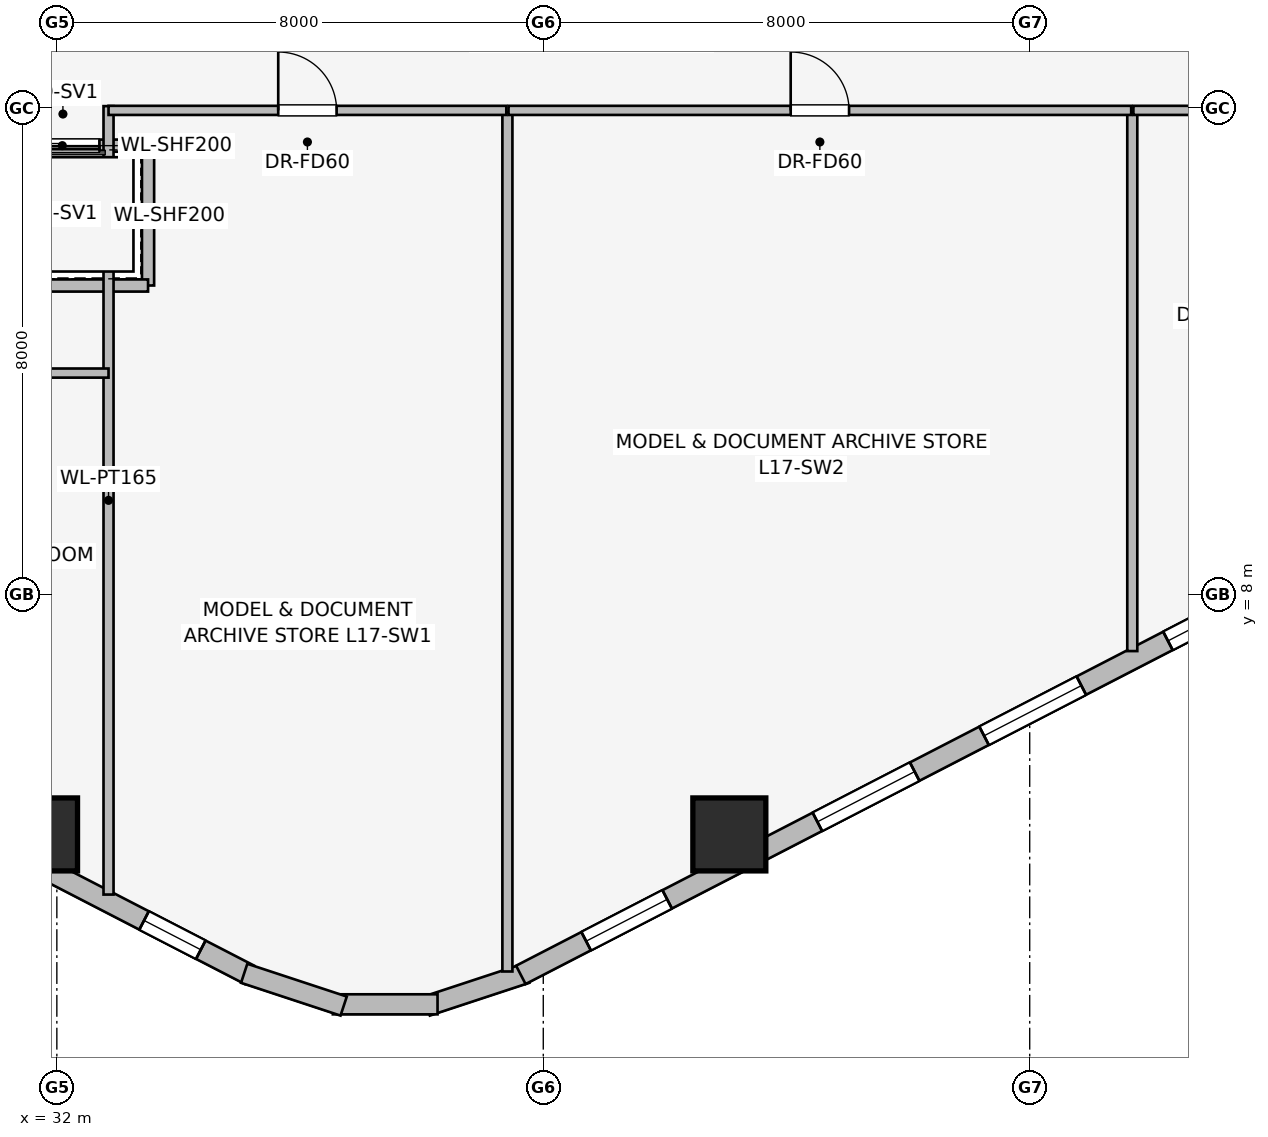
"""IFC4 building model, lengths in metres.
Left out: names, types, materials, properties, quantities, classifications, styles, units other than length and angle.
Written with IfcOpenShell. Run it as: python <this file> out.ifc"""

import sys

from ifc_helpers import new_model, si_unit, direction, frame, frame_2d, origin, origin_2d, place, context, subcontext, project, spatial, rectangle, extrude, element, fill, save


model = new_model("IFC4")
c1 = context("Model", 3, precision=1e-05, world=origin(), true_north=direction((0.0, 1.0)))
c2 = subcontext(c1, "Body", "Model", "MODEL_VIEW")
j1 = project(units=[si_unit("LENGTHUNIT", "METRE"), si_unit("PLANEANGLEUNIT", "RADIAN")], contexts=[c1])
p1 = place(None, origin())
s1 = spatial("IfcSite", under=j1, at=p1, CompositionType="ELEMENT")
p2 = place(p1, origin())
s2 = spatial("IfcBuilding", under=s1, at=p2, CompositionType="ELEMENT")
p3 = place(p2, frame((0.0, 0.0, 67.15)))
s3 = spatial("IfcBuildingStorey", under=s2, at=p3, CompositionType="ELEMENT", Elevation=67.15)
for number, where, z_axis, x_axis in (
    (1, (31.74, 4.053, 0.0), (0.0, 0.0, 1.0), (1.0, 0.0, 0.0)),
    (2, (43.06, 4.053, 0.0), (0.0, 0.0, 1.0), (1.0, 0.0, 0.0)),
):
    element("IfcColumn", number, at=place(p3, frame(where, z_axis=z_axis, x_axis=x_axis)), inside=s3, PredefinedType="COLUMN", context=c2, shape_type="SweptSolid", body=[
        extrude(rectangle(XDim=1.2, YDim=1.2, at=origin_2d()), origin(), (0.0, 0.0, 1.0), 3.65),
    ])
p4 = place(p3, frame((35.169, 1.743, 0.0), z_axis=(0.0, 0.0, 1.0), x_axis=(-0.888634413993, 0.458616264721, 0.0)))
e3 = element("IfcWall", 3, at=p4, inside=s3, PredefinedType="STANDARD", context=c2, shape_type="SweptSolid", body=[
    extrude(rectangle(XDim=20.531, YDim=0.34, at=frame_2d((10.266, 0.0))), origin(), (0.0, 0.0, 1.0), 2.684),
])
p5 = place(p4, frame((0.902, 0.0, 0.75)))
e4 = element("IfcOpeningElement", 4, at=p5, cuts=e3, PredefinedType="OPENING", context=c2, shape_type="SweptSolid", body=[
    extrude(rectangle(XDim=1.05, YDim=1.4, at=frame_2d((0.525, 0.7))), frame((0.0, 0.18, 0.0), z_axis=(0.0, -1.0, 0.0), x_axis=(1.0, 0.0, 0.0)), (0.0, 0.0, 1.0), 0.36),
])
p6 = place(p4, frame((5.903, 0.0, 0.75)))
e5 = element("IfcOpeningElement", 5, at=p6, cuts=e3, PredefinedType="OPENING", context=c2, shape_type="SweptSolid", body=[
    extrude(rectangle(XDim=1.5, YDim=1.5, at=frame_2d((0.75, 0.75))), frame((0.0, 0.18, 0.0), z_axis=(0.0, -1.0, 0.0), x_axis=(1.0, 0.0, 0.0)), (0.0, 0.0, 1.0), 0.36),
])
p7 = place(p4, frame((9.516, 0.0, 0.75)))
e6 = element("IfcOpeningElement", 6, at=p7, cuts=e3, PredefinedType="OPENING", context=c2, shape_type="SweptSolid", body=[
    extrude(rectangle(XDim=1.5, YDim=1.5, at=frame_2d((0.75, 0.75))), frame((0.0, 0.18, 0.0), z_axis=(0.0, -1.0, 0.0), x_axis=(1.0, 0.0, 0.0)), (0.0, 0.0, 1.0), 0.36),
])
p8 = place(p4, frame((13.129, 0.0, 0.75)))
e7 = element("IfcOpeningElement", 7, at=p8, cuts=e3, PredefinedType="OPENING", context=c2, shape_type="SweptSolid", body=[
    extrude(rectangle(XDim=1.5, YDim=1.5, at=frame_2d((0.75, 0.75))), frame((0.0, 0.18, 0.0), z_axis=(0.0, -1.0, 0.0), x_axis=(1.0, 0.0, 0.0)), (0.0, 0.0, 1.0), 0.36),
])
p9 = place(p4, frame((17.673, 0.0, 0.75)))
e8 = element("IfcOpeningElement", 8, at=p9, cuts=e3, PredefinedType="OPENING", context=c2, shape_type="SweptSolid", body=[
    extrude(rectangle(XDim=1.8, YDim=1.5, at=frame_2d((0.9, 0.75))), frame((0.0, 0.18, 0.0), z_axis=(0.0, -1.0, 0.0), x_axis=(1.0, 0.0, 0.0)), (0.0, 0.0, 1.0), 0.36),
])
p10 = place(p3, frame((39.719, 1.769, 0.0), z_axis=(0.0, 0.0, 1.0), x_axis=(-0.94976901097, -0.312951794691, 0.0)))
e9 = element("IfcWall", 9, at=p10, inside=s3, PredefinedType="STANDARD", context=c2, shape_type="SweptSolid", body=[
    extrude(rectangle(XDim=1.722, YDim=0.33, at=frame_2d((0.861, 0.0))), origin(), (0.0, 0.0, 1.0), 3.39),
])
p11 = place(p3, frame((38.261, 1.259, 0.0), z_axis=(0.0, 0.0, 1.0), x_axis=(-1.0, 0.0, 0.0)))
e10 = element("IfcWall", 10, at=p11, inside=s3, PredefinedType="STANDARD", context=c2, shape_type="SweptSolid", body=[
    extrude(rectangle(XDim=1.722, YDim=0.33, at=frame_2d((0.861, 0.0))), origin(), (0.0, 0.0, 1.0), 3.39),
])
p12 = place(p3, frame((36.717, 1.23, 0.0), z_axis=(0.0, 0.0, 1.0), x_axis=(-0.94976901097, 0.312951794691, 0.0)))
e11 = element("IfcWall", 11, at=p12, inside=s3, PredefinedType="STANDARD", context=c2, shape_type="SweptSolid", body=[
    extrude(rectangle(XDim=1.722, YDim=0.33, at=frame_2d((0.861, 0.0))), origin(), (0.0, 0.0, 1.0), 3.39),
])
p13 = place(p3, frame((57.876, 11.159, 0.0), z_axis=(0.0, 0.0, 1.0), x_axis=(-0.888634413993, -0.458616264721, 0.0)))
e12 = element("IfcWall", 12, at=p13, inside=s3, PredefinedType="STANDARD", context=c2, shape_type="SweptSolid", body=[
    extrude(rectangle(XDim=20.531, YDim=0.34, at=frame_2d((10.266, 0.0))), origin(), (0.0, 0.0, 1.0), 2.684),
])
p14 = place(p13, frame((1.032, 0.0, 0.75)))
e13 = element("IfcOpeningElement", 13, at=p14, cuts=e12, PredefinedType="OPENING", context=c2, shape_type="SweptSolid", body=[
    extrude(rectangle(XDim=1.8, YDim=1.5, at=frame_2d((0.9, 0.75))), frame((0.0, 0.18, 0.0), z_axis=(0.0, -1.0, 0.0), x_axis=(1.0, 0.0, 0.0)), (0.0, 0.0, 1.0), 0.36),
])
p15 = place(p13, frame((5.082, 0.0, 0.75)))
e14 = element("IfcOpeningElement", 14, at=p15, cuts=e12, PredefinedType="OPENING", context=c2, shape_type="SweptSolid", body=[
    extrude(rectangle(XDim=1.5, YDim=1.5, at=frame_2d((0.75, 0.75))), frame((0.0, 0.18, 0.0), z_axis=(0.0, -1.0, 0.0), x_axis=(1.0, 0.0, 0.0)), (0.0, 0.0, 1.0), 0.36),
])
p16 = place(p13, frame((7.055, 0.0, 0.75)))
e15 = element("IfcOpeningElement", 15, at=p16, cuts=e12, PredefinedType="OPENING", context=c2, shape_type="SweptSolid", body=[
    extrude(rectangle(XDim=1.5, YDim=1.5, at=frame_2d((0.75, 0.75))), frame((0.0, 0.18, 0.0), z_axis=(0.0, -1.0, 0.0), x_axis=(1.0, 0.0, 0.0)), (0.0, 0.0, 1.0), 0.36),
])
p17 = place(p13, frame((10.158, 0.0, 0.75)))
e16 = element("IfcOpeningElement", 16, at=p17, cuts=e12, PredefinedType="OPENING", context=c2, shape_type="SweptSolid", body=[
    extrude(rectangle(XDim=1.8, YDim=1.5, at=frame_2d((0.9, 0.75))), frame((0.0, 0.18, 0.0), z_axis=(0.0, -1.0, 0.0), x_axis=(1.0, 0.0, 0.0)), (0.0, 0.0, 1.0), 0.36),
])
p18 = place(p13, frame((13.243, 0.0, 0.75)))
e17 = element("IfcOpeningElement", 17, at=p18, cuts=e12, PredefinedType="OPENING", context=c2, shape_type="SweptSolid", body=[
    extrude(rectangle(XDim=1.8, YDim=1.5, at=frame_2d((0.9, 0.75))), frame((0.0, 0.18, 0.0), z_axis=(0.0, -1.0, 0.0), x_axis=(1.0, 0.0, 0.0)), (0.0, 0.0, 1.0), 0.36),
])
p19 = place(p13, frame((17.823, 0.0, 0.75)))
e18 = element("IfcOpeningElement", 18, at=p19, cuts=e12, PredefinedType="OPENING", context=c2, shape_type="SweptSolid", body=[
    extrude(rectangle(XDim=1.5, YDim=1.5, at=frame_2d((0.75, 0.75))), frame((0.0, 0.18, 0.0), z_axis=(0.0, -1.0, 0.0), x_axis=(1.0, 0.0, 0.0)), (0.0, 0.0, 1.0), 0.36),
])
p20 = place(p3, frame((33.5, 15.38, 0.0), z_axis=(0.0, 0.0, 1.0), x_axis=(-1.0, 0.0, 0.0)))
e19 = element("IfcWall", 19, at=p20, inside=s3, PredefinedType="PARTITIONING", context=c2, shape_type="SweptSolid", body=[
    extrude(rectangle(XDim=2.82, YDim=0.2, at=frame_2d((1.41, 0.0))), origin(), (0.0, 0.0, 1.0), 3.39),
])
p21 = place(p20, frame((0.8, 0.0, 0.0)))
e20 = element("IfcOpeningElement", 20, at=p21, cuts=e19, PredefinedType="OPENING", context=c2, shape_type="SweptSolid", body=[
    extrude(rectangle(XDim=1.2, YDim=2.2, at=frame_2d((0.6, 1.1))), frame((0.0, 0.11, 0.0), z_axis=(0.0, -1.0, 0.0), x_axis=(1.0, 0.0, 0.0)), (0.0, 0.0, 1.0), 0.22),
])
p22 = place(p3, frame((33.5, 13.08, 0.0), z_axis=(0.0, 0.0, 1.0), x_axis=(0.0, 1.0, 0.0)))
e21 = element("IfcWall", 21, at=p22, inside=s3, PredefinedType="PARTITIONING", context=c2, shape_type="SweptSolid", body=[
    extrude(rectangle(XDim=2.3, YDim=0.2, at=frame_2d((1.15, 0.0))), origin(), (0.0, 0.0, 1.0), 3.39),
])
p23 = place(p3, frame((30.879, 13.08, 0.0), z_axis=(0.0, 0.0, 1.0), x_axis=(1.0, 0.0, 0.0)))
e22 = element("IfcWall", 22, at=p23, inside=s3, PredefinedType="PARTITIONING", context=c2, shape_type="SweptSolid", body=[
    extrude(rectangle(XDim=2.621, YDim=0.2, at=frame_2d((1.311, 0.0))), origin(), (0.0, 0.0, 1.0), 3.39),
])
p24 = place(p3, frame((32.85, 3.064, 0.0), z_axis=(0.0, 0.0, 1.0), x_axis=(0.0, 1.0, 0.0)))
e23 = element("IfcWall", 23, at=p24, inside=s3, PredefinedType="PARTITIONING", context=c2, shape_type="SweptSolid", body=[
    extrude(rectangle(XDim=12.966, YDim=0.165, at=frame_2d((6.483, 0.0))), origin(), (0.0, 0.0, 1.0), 3.39),
])
p25 = place(p3, frame((16.487, 11.64, 0.0), z_axis=(0.0, 0.0, 1.0), x_axis=(1.0, 0.0, 0.0)))
e24 = element("IfcWall", 24, at=p25, inside=s3, PredefinedType="PARTITIONING", context=c2, shape_type="SweptSolid", body=[
    extrude(rectangle(XDim=16.363, YDim=0.15, at=frame_2d((8.182, 0.0))), origin(), (0.0, 0.0, 1.0), 3.39),
])
p26 = place(p25, frame((6.513, 0.0, 0.0)))
e25 = element("IfcOpeningElement", 25, at=p26, cuts=e24, PredefinedType="OPENING", context=c2, shape_type="SweptSolid", body=[
    extrude(rectangle(XDim=0.9, YDim=2.0, at=frame_2d((0.45, 1.0))), frame((0.0, 0.085, 0.0), z_axis=(0.0, -1.0, 0.0), x_axis=(1.0, 0.0, 0.0)), (0.0, 0.0, 1.0), 0.17),
])
p27 = place(p3, frame((39.41, 1.799, 0.0), z_axis=(0.0, 0.0, 1.0), x_axis=(0.0, 1.0, 0.0)))
e26 = element("IfcWall", 26, at=p27, inside=s3, PredefinedType="PARTITIONING", context=c2, shape_type="SweptSolid", body=[
    extrude(rectangle(XDim=14.131, YDim=0.165, at=frame_2d((7.065, 0.0))), origin(), (0.0, 0.0, 1.0), 3.39),
])
p28 = place(p3, frame((49.687, 7.068, 0.0), z_axis=(0.0, 0.0, 1.0), x_axis=(0.0, 1.0, 0.0)))
e27 = element("IfcWall", 27, at=p28, inside=s3, PredefinedType="PARTITIONING", context=c2, shape_type="SweptSolid", body=[
    extrude(rectangle(XDim=8.862, YDim=0.165, at=frame_2d((4.431, 0.0))), origin(), (0.0, 0.0, 1.0), 3.39),
])
p29 = place(p3, frame((32.85, 15.96, 0.0), z_axis=(0.0, 0.0, 1.0), x_axis=(1.0, 0.0, 0.0)))
e28 = element("IfcWall", 28, at=p29, inside=s3, PredefinedType="PARTITIONING", context=c2, shape_type="SweptSolid", body=[
    extrude(rectangle(XDim=6.542, YDim=0.15, at=frame_2d((3.271, 0.0))), origin(), (0.0, 0.0, 1.0), 3.39),
])
p30 = place(p29, frame((2.791, 0.0, 0.0)))
e29 = element("IfcOpeningElement", 29, at=p30, cuts=e28, PredefinedType="OPENING", context=c2, shape_type="SweptSolid", body=[
    extrude(rectangle(XDim=0.96, YDim=2.0, at=frame_2d((0.48, 1.0))), frame((0.0, 0.085, 0.0), z_axis=(0.0, -1.0, 0.0), x_axis=(1.0, 0.0, 0.0)), (0.0, 0.0, 1.0), 0.17),
])
p31 = place(p3, frame((39.428, 15.96, 0.0), z_axis=(0.0, 0.0, 1.0), x_axis=(1.0, 0.0, 0.0)))
e30 = element("IfcWall", 30, at=p31, inside=s3, PredefinedType="PARTITIONING", context=c2, shape_type="SweptSolid", body=[
    extrude(rectangle(XDim=10.241, YDim=0.15, at=frame_2d((5.121, 0.0))), origin(), (0.0, 0.0, 1.0), 3.39),
])
p32 = place(p31, frame((4.641, 0.0, 0.0)))
e31 = element("IfcOpeningElement", 31, at=p32, cuts=e30, PredefinedType="OPENING", context=c2, shape_type="SweptSolid", body=[
    extrude(rectangle(XDim=0.96, YDim=2.0, at=frame_2d((0.48, 1.0))), frame((0.0, 0.085, 0.0), z_axis=(0.0, -1.0, 0.0), x_axis=(1.0, 0.0, 0.0)), (0.0, 0.0, 1.0), 0.17),
])
p33 = place(p3, frame((49.705, 15.96, 0.0), z_axis=(0.0, 0.0, 1.0), x_axis=(1.0, 0.0, 0.0)))
e32 = element("IfcWall", 32, at=p33, inside=s3, PredefinedType="PARTITIONING", context=c2, shape_type="SweptSolid", body=[
    extrude(rectangle(XDim=4.831, YDim=0.15, at=frame_2d((2.416, 0.0))), origin(), (0.0, 0.0, 1.0), 3.39),
])
p34 = place(p33, frame((1.936, 0.0, 0.0)))
e33 = element("IfcOpeningElement", 33, at=p34, cuts=e32, PredefinedType="OPENING", context=c2, shape_type="SweptSolid", body=[
    extrude(rectangle(XDim=0.96, YDim=2.0, at=frame_2d((0.48, 1.0))), frame((0.0, 0.085, 0.0), z_axis=(0.0, -1.0, 0.0), x_axis=(1.0, 0.0, 0.0)), (0.0, 0.0, 1.0), 0.17),
])
p35 = place(p5, origin())
e34 = element("IfcWindow", 34, at=p35, inside=s3, PartitioningType="SINGLE_PANEL", PredefinedType="WINDOW", context=c2, shape_type="SweptSolid", body=[
    extrude(rectangle(XDim=1.05, YDim=1.4, at=frame_2d((0.525, 0.7))), frame((0.0, 0.03, 0.0), z_axis=(0.0, -1.0, 0.0), x_axis=(1.0, 0.0, 0.0)), (0.0, 0.0, 1.0), 0.06),
])
fill(e4, e34)
p36 = place(p16, origin())
e35 = element("IfcWindow", 35, at=p36, inside=s3, PartitioningType="SINGLE_PANEL", PredefinedType="WINDOW", context=c2, shape_type="SweptSolid", body=[
    extrude(rectangle(XDim=1.5, YDim=1.5, at=frame_2d((0.75, 0.75))), frame((0.0, 0.03, 0.0), z_axis=(0.0, -1.0, 0.0), x_axis=(1.0, 0.0, 0.0)), (0.0, 0.0, 1.0), 0.06),
])
fill(e15, e35)
p37 = place(p17, origin())
e36 = element("IfcWindow", 36, at=p37, inside=s3, PartitioningType="SINGLE_PANEL", PredefinedType="WINDOW", context=c2, shape_type="SweptSolid", body=[
    extrude(rectangle(XDim=1.8, YDim=1.5, at=frame_2d((0.9, 0.75))), frame((0.0, 0.03, 0.0), z_axis=(0.0, -1.0, 0.0), x_axis=(1.0, 0.0, 0.0)), (0.0, 0.0, 1.0), 0.06),
])
fill(e16, e36)
p38 = place(p18, origin())
e37 = element("IfcWindow", 37, at=p38, inside=s3, PartitioningType="SINGLE_PANEL", PredefinedType="WINDOW", context=c2, shape_type="SweptSolid", body=[
    extrude(rectangle(XDim=1.8, YDim=1.5, at=frame_2d((0.9, 0.75))), frame((0.0, 0.03, 0.0), z_axis=(0.0, -1.0, 0.0), x_axis=(1.0, 0.0, 0.0)), (0.0, 0.0, 1.0), 0.06),
])
fill(e17, e37)
p39 = place(p19, origin())
e38 = element("IfcWindow", 38, at=p39, inside=s3, PartitioningType="SINGLE_PANEL", PredefinedType="WINDOW", context=c2, shape_type="SweptSolid", body=[
    extrude(rectangle(XDim=1.5, YDim=1.5, at=frame_2d((0.75, 0.75))), frame((0.0, 0.03, 0.0), z_axis=(0.0, -1.0, 0.0), x_axis=(1.0, 0.0, 0.0)), (0.0, 0.0, 1.0), 0.06),
])
fill(e18, e38)
p40 = place(p21, origin())
e39 = element("IfcDoor", 39, at=p40, inside=s3, OperationType="SLIDING_TO_RIGHT", PredefinedType="DOOR", context=c2, shape_type="SweptSolid", body=[
    extrude(rectangle(XDim=1.2, YDim=2.2, at=frame_2d((0.6, 1.1))), frame((0.0, 0.025, 0.0), z_axis=(0.0, -1.0, 0.0), x_axis=(1.0, 0.0, 0.0)), (0.0, 0.0, 1.0), 0.05),
])
fill(e20, e39)
p41 = place(p30, origin())
e40 = element("IfcDoor", 40, at=p41, inside=s3, OperationType="SINGLE_SWING_LEFT", PredefinedType="DOOR", context=c2, shape_type="SweptSolid", body=[
    extrude(rectangle(XDim=0.96, YDim=2.0, at=frame_2d((0.48, 1.0))), frame((0.0, 0.025, 0.0), z_axis=(0.0, -1.0, 0.0), x_axis=(1.0, 0.0, 0.0)), (0.0, 0.0, 1.0), 0.05),
])
fill(e29, e40)
p42 = place(p32, origin())
e41 = element("IfcDoor", 41, at=p42, inside=s3, OperationType="SINGLE_SWING_LEFT", PredefinedType="DOOR", context=c2, shape_type="SweptSolid", body=[
    extrude(rectangle(XDim=0.96, YDim=2.0, at=frame_2d((0.48, 1.0))), frame((0.0, 0.025, 0.0), z_axis=(0.0, -1.0, 0.0), x_axis=(1.0, 0.0, 0.0)), (0.0, 0.0, 1.0), 0.05),
])
fill(e31, e41)
save(model, sys.argv[1])
